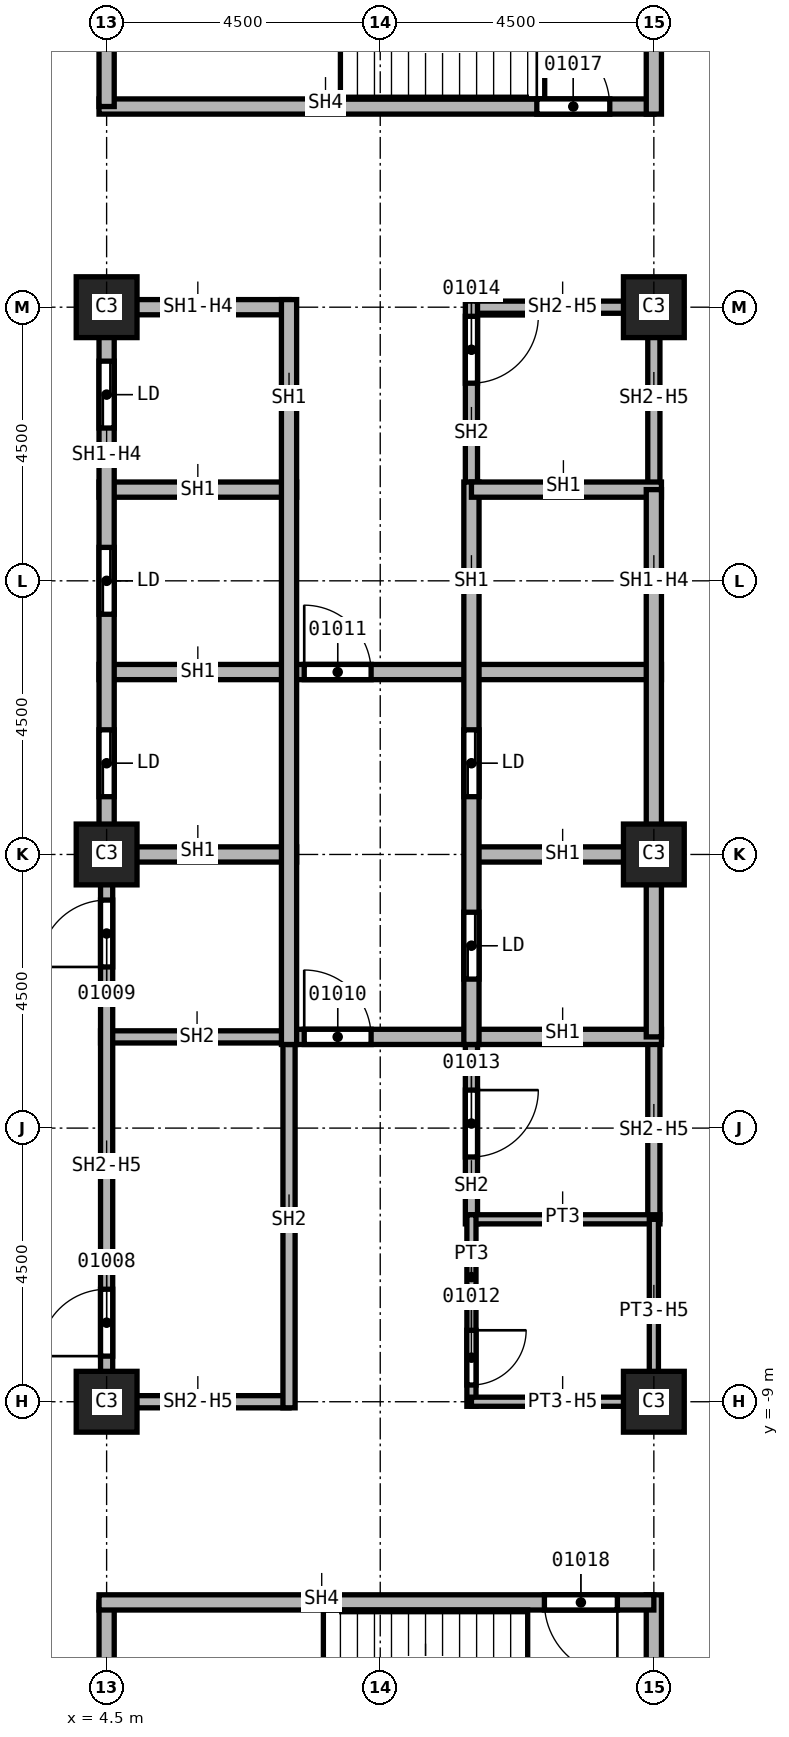
"""IFC4 building model, lengths in metres.
Left out: names, types, materials, properties, quantities, classifications, styles, units other than length and angle.
Written with IfcOpenShell. Run it as: python <this file> out.ifc"""

import sys

from ifc_helpers import new_model, si_unit, direction, frame, frame_2d, origin, origin_2d, place, context, subcontext, project, spatial, rectangle, extrude, element, fill, save


model = new_model("IFC4")
c1 = context("Model", 3, precision=1e-05, world=origin(), true_north=direction((0.0, 1.0)))
c2 = subcontext(c1, "Body", "Model", "MODEL_VIEW")
j1 = project(units=[si_unit("LENGTHUNIT", "METRE"), si_unit("PLANEANGLEUNIT", "RADIAN")], contexts=[c1])
p1 = place(None, origin())
s1 = spatial("IfcSite", under=j1, at=p1, CompositionType="ELEMENT")
p2 = place(p1, origin())
s2 = spatial("IfcBuilding", under=s1, at=p2, CompositionType="ELEMENT")
p3 = place(p2, frame((0.0, 0.0, 68.0)))
s3 = spatial("IfcBuildingStorey", under=s2, at=p3, CompositionType="ELEMENT", Elevation=68.0)
for number, where, z_axis, x_axis in (
    (1, (4.5, 0.0, 0.0), (0.0, 0.0, 1.0), (1.0, 0.0, 0.0)),
    (2, (4.5, 9.0, 0.0), (0.0, 0.0, 1.0), (1.0, 0.0, 0.0)),
    (3, (4.5, -9.0, 0.0), (0.0, 0.0, 1.0), (1.0, 0.0, 0.0)),
    (4, (13.5, 0.0, 0.0), (0.0, 0.0, 1.0), (1.0, 0.0, 0.0)),
    (5, (13.5, 9.0, 0.0), (0.0, 0.0, 1.0), (1.0, 0.0, 0.0)),
    (6, (13.5, -9.0, 0.0), (0.0, 0.0, 1.0), (1.0, 0.0, 0.0)),
):
    element("IfcColumn", number, at=place(p3, frame(where, z_axis=z_axis, x_axis=x_axis)), inside=s3, PredefinedType="COLUMN", context=c2, shape_type="SweptSolid", body=[
        extrude(rectangle(XDim=1.0, YDim=1.0, at=origin_2d()), origin(), (0.0, 0.0, 1.0), 3.7),
    ])
p4 = place(p3, frame((4.4, -3.0, 0.0), z_axis=(0.0, 0.0, 1.0), x_axis=(1.0, 0.0, 0.0)))
e7 = element("IfcWall", 7, at=p4, inside=s3, PredefinedType="SOLIDWALL", context=c2, shape_type="SweptSolid", body=[
    extrude(rectangle(XDim=3.225, YDim=0.2, at=frame_2d((1.613, 0.0))), origin(), (0.0, 0.0, 1.0), 3.7),
])
p5 = place(p3, frame((4.5, -9.1, 0.0), z_axis=(0.0, 0.0, 1.0), x_axis=(0.0, 1.0, 0.0)))
e8 = element("IfcWall", 8, at=p5, inside=s3, PredefinedType="SOLIDWALL", context=c2, shape_type="SweptSolid", body=[
    extrude(rectangle(XDim=9.1, YDim=0.2, at=frame_2d((4.55, 0.0))), origin(), (0.0, 0.0, 1.0), 2.938),
])
p6 = place(p5, frame((0.85, 0.0, 0.0)))
e9 = element("IfcOpeningElement", 9, at=p6, cuts=e8, PredefinedType="OPENING", context=c2, shape_type="SweptSolid", body=[
    extrude(rectangle(XDim=1.1, YDim=2.1, at=frame_2d((0.55, 1.05))), frame((0.0, 0.1, 0.0), z_axis=(0.0, -1.0, 0.0), x_axis=(1.0, 0.0, 0.0)), (0.0, 0.0, 1.0), 0.2),
])
p7 = place(p5, frame((7.25, 0.0, 0.0)))
e10 = element("IfcOpeningElement", 10, at=p7, cuts=e8, PredefinedType="OPENING", context=c2, shape_type="SweptSolid", body=[
    extrude(rectangle(XDim=1.1, YDim=2.1, at=frame_2d((0.55, 1.05))), frame((0.0, 0.1, 0.0), z_axis=(0.0, -1.0, 0.0), x_axis=(1.0, 0.0, 0.0)), (0.0, 0.0, 1.0), 0.2),
])
p8 = place(p3, frame((7.5, -9.0, 0.0), z_axis=(0.0, 0.0, 1.0), x_axis=(-1.0, 0.0, 0.0)))
e11 = element("IfcWall", 11, at=p8, inside=s3, PredefinedType="SOLIDWALL", context=c2, shape_type="SweptSolid", body=[
    extrude(rectangle(XDim=3.0, YDim=0.2, at=frame_2d((1.5, 0.0))), origin(), (0.0, 0.0, 1.0), 2.938),
])
p9 = place(p3, frame((7.5, -2.875, 0.0), z_axis=(0.0, 0.0, 1.0), x_axis=(0.0, -1.0, 0.0)))
e12 = element("IfcWall", 12, at=p9, inside=s3, PredefinedType="SOLIDWALL", context=c2, shape_type="SweptSolid", body=[
    extrude(rectangle(XDim=6.225, YDim=0.2, at=frame_2d((3.113, 0.0))), origin(), (0.0, 0.0, 1.0), 3.7),
])
p10 = place(p3, frame((10.5, -2.875, 0.0), z_axis=(0.0, 0.0, 1.0), x_axis=(0.0, -1.0, 0.0)))
e13 = element("IfcWall", 13, at=p10, inside=s3, PredefinedType="SOLIDWALL", context=c2, shape_type="SweptSolid", body=[
    extrude(rectangle(XDim=3.2, YDim=0.2, at=frame_2d((1.6, 0.0))), origin(), (0.0, 0.0, 1.0), 3.7),
])
p11 = place(p10, frame((1.0, 0.0, 0.0)))
e14 = element("IfcOpeningElement", 14, at=p11, cuts=e13, PredefinedType="OPENING", context=c2, shape_type="SweptSolid", body=[
    extrude(rectangle(XDim=1.1, YDim=2.1, at=frame_2d((0.55, 1.05))), frame((0.0, 0.1, 0.0), z_axis=(0.0, -1.0, 0.0), x_axis=(1.0, 0.0, 0.0)), (0.0, 0.0, 1.0), 0.2),
])
p12 = place(p3, frame((10.5, 9.0, 0.0), z_axis=(0.0, 0.0, 1.0), x_axis=(1.0, 0.0, 0.0)))
e15 = element("IfcWall", 15, at=p12, inside=s3, PredefinedType="SOLIDWALL", context=c2, shape_type="SweptSolid", body=[
    extrude(rectangle(XDim=3.0, YDim=0.2, at=frame_2d((1.5, 0.0))), origin(), (0.0, 0.0, 1.0), 2.938),
])
p13 = place(p3, frame((10.5, 9.1, 0.0), z_axis=(0.0, 0.0, 1.0), x_axis=(0.0, -1.0, 0.0)))
e16 = element("IfcWall", 16, at=p13, inside=s3, PredefinedType="SOLIDWALL", context=c2, shape_type="SweptSolid", body=[
    extrude(rectangle(XDim=3.225, YDim=0.2, at=frame_2d((1.613, 0.0))), origin(), (0.0, 0.0, 1.0), 3.7),
])
p14 = place(p13, frame((0.25, 0.0, 0.0)))
e17 = element("IfcOpeningElement", 17, at=p14, cuts=e16, PredefinedType="OPENING", context=c2, shape_type="SweptSolid", body=[
    extrude(rectangle(XDim=1.1, YDim=2.1, at=frame_2d((0.55, 1.05))), frame((0.0, 0.1, 0.0), z_axis=(0.0, -1.0, 0.0), x_axis=(1.0, 0.0, 0.0)), (0.0, 0.0, 1.0), 0.2),
])
p15 = place(p3, frame((13.5, -3.0, 0.0), z_axis=(0.0, 0.0, 1.0), x_axis=(0.0, -1.0, 0.0)))
e18 = element("IfcWall", 18, at=p15, inside=s3, PredefinedType="SOLIDWALL", context=c2, shape_type="SweptSolid", body=[
    extrude(rectangle(XDim=3.0, YDim=0.2, at=frame_2d((1.5, 0.0))), origin(), (0.0, 0.0, 1.0), 2.938),
])
p16 = place(p3, frame((13.5, 9.1, 0.0), z_axis=(0.0, 0.0, 1.0), x_axis=(0.0, -1.0, 0.0)))
e19 = element("IfcWall", 19, at=p16, inside=s3, PredefinedType="SOLIDWALL", context=c2, shape_type="SweptSolid", body=[
    extrude(rectangle(XDim=3.1, YDim=0.2, at=frame_2d((1.55, 0.0))), origin(), (0.0, 0.0, 1.0), 2.938),
])
p17 = place(p3, frame((4.375, 0.0, 0.0), z_axis=(0.0, 0.0, 1.0), x_axis=(1.0, 0.0, 0.0)))
e20 = element("IfcWall", 20, at=p17, inside=s3, PredefinedType="SOLIDWALL", context=c2, shape_type="SweptSolid", body=[
    extrude(rectangle(XDim=3.25, YDim=0.25, at=frame_2d((1.625, 0.0))), origin(), (0.0, 0.0, 1.0), 3.7),
])
p18 = place(p3, frame((4.375, 3.0, 0.0), z_axis=(0.0, 0.0, 1.0), x_axis=(1.0, 0.0, 0.0)))
e21 = element("IfcWall", 21, at=p18, inside=s3, PredefinedType="SOLIDWALL", context=c2, shape_type="SweptSolid", body=[
    extrude(rectangle(XDim=9.25, YDim=0.25, at=frame_2d((4.625, 0.0))), origin(), (0.0, 0.0, 1.0), 3.7),
])
p19 = place(p18, frame((3.375, 0.0, 0.0)))
e22 = element("IfcOpeningElement", 22, at=p19, cuts=e21, PredefinedType="OPENING", context=c2, shape_type="SweptSolid", body=[
    extrude(rectangle(XDim=1.1, YDim=2.1, at=frame_2d((0.55, 1.05))), frame((0.0, 0.125, 0.0), z_axis=(0.0, -1.0, 0.0), x_axis=(1.0, 0.0, 0.0)), (0.0, 0.0, 1.0), 0.25),
])
p20 = place(p3, frame((4.375, 6.0, 0.0), z_axis=(0.0, 0.0, 1.0), x_axis=(1.0, 0.0, 0.0)))
e23 = element("IfcWall", 23, at=p20, inside=s3, PredefinedType="SOLIDWALL", context=c2, shape_type="SweptSolid", body=[
    extrude(rectangle(XDim=3.25, YDim=0.25, at=frame_2d((1.625, 0.0))), origin(), (0.0, 0.0, 1.0), 3.7),
])
p21 = place(p3, frame((4.5, 0.0, 0.0), z_axis=(0.0, 0.0, 1.0), x_axis=(0.0, 1.0, 0.0)))
e24 = element("IfcWall", 24, at=p21, inside=s3, PredefinedType="SOLIDWALL", context=c2, shape_type="SweptSolid", body=[
    extrude(rectangle(XDim=9.125, YDim=0.25, at=frame_2d((4.562, 0.0))), origin(), (0.0, 0.0, 1.0), 2.938),
])
p22 = place(p21, frame((0.95, 0.0, 0.0)))
e25 = element("IfcOpeningElement", 25, at=p22, cuts=e24, PredefinedType="OPENING", context=c2, shape_type="SweptSolid", body=[
    extrude(rectangle(XDim=1.1, YDim=2.1, at=frame_2d((0.55, 1.05))), frame((0.0, 0.125, 0.0), z_axis=(0.0, -1.0, 0.0), x_axis=(1.0, 0.0, 0.0)), (0.0, 0.0, 1.0), 0.25),
])
p23 = place(p21, frame((3.95, 0.0, 0.0)))
e26 = element("IfcOpeningElement", 26, at=p23, cuts=e24, PredefinedType="OPENING", context=c2, shape_type="SweptSolid", body=[
    extrude(rectangle(XDim=1.1, YDim=2.1, at=frame_2d((0.55, 1.05))), frame((0.0, 0.125, 0.0), z_axis=(0.0, -1.0, 0.0), x_axis=(1.0, 0.0, 0.0)), (0.0, 0.0, 1.0), 0.25),
])
p24 = place(p21, frame((7.012, 0.0, 0.0)))
e27 = element("IfcOpeningElement", 27, at=p24, cuts=e24, PredefinedType="OPENING", context=c2, shape_type="SweptSolid", body=[
    extrude(rectangle(XDim=1.1, YDim=2.1, at=frame_2d((0.55, 1.05))), frame((0.0, 0.125, 0.0), z_axis=(0.0, -1.0, 0.0), x_axis=(1.0, 0.0, 0.0)), (0.0, 0.0, 1.0), 0.25),
])
p25 = place(p3, frame((4.5, 9.0, 0.0), z_axis=(0.0, 0.0, 1.0), x_axis=(1.0, 0.0, 0.0)))
e28 = element("IfcWall", 28, at=p25, inside=s3, PredefinedType="SOLIDWALL", context=c2, shape_type="SweptSolid", body=[
    extrude(rectangle(XDim=3.0, YDim=0.25, at=frame_2d((1.5, 0.0))), origin(), (0.0, 0.0, 1.0), 2.938),
])
p26 = place(p3, frame((7.5, -3.0, 0.0), z_axis=(0.0, 0.0, 1.0), x_axis=(1.0, 0.0, 0.0)))
e29 = element("IfcWall", 29, at=p26, inside=s3, PredefinedType="SOLIDWALL", context=c2, shape_type="SweptSolid", body=[
    extrude(rectangle(XDim=6.125, YDim=0.25, at=frame_2d((3.062, 0.0))), origin(), (0.0, 0.0, 1.0), 3.7),
])
p27 = place(p26, frame((0.25, 0.0, 0.0)))
e30 = element("IfcOpeningElement", 30, at=p27, cuts=e29, PredefinedType="OPENING", context=c2, shape_type="SweptSolid", body=[
    extrude(rectangle(XDim=1.1, YDim=2.1, at=frame_2d((0.55, 1.05))), frame((0.0, 0.125, 0.0), z_axis=(0.0, -1.0, 0.0), x_axis=(1.0, 0.0, 0.0)), (0.0, 0.0, 1.0), 0.25),
])
p28 = place(p3, frame((7.5, 9.125, 0.0), z_axis=(0.0, 0.0, 1.0), x_axis=(0.0, -1.0, 0.0)))
e31 = element("IfcWall", 31, at=p28, inside=s3, PredefinedType="SOLIDWALL", context=c2, shape_type="SweptSolid", body=[
    extrude(rectangle(XDim=12.25, YDim=0.25, at=frame_2d((6.125, 0.0))), origin(), (0.0, 0.0, 1.0), 3.7),
])
p29 = place(p3, frame((10.5, 0.0, 0.0), z_axis=(0.0, 0.0, 1.0), x_axis=(1.0, 0.0, 0.0)))
e32 = element("IfcWall", 32, at=p29, inside=s3, PredefinedType="SOLIDWALL", context=c2, shape_type="SweptSolid", body=[
    extrude(rectangle(XDim=3.125, YDim=0.25, at=frame_2d((1.562, 0.0))), origin(), (0.0, 0.0, 1.0), 3.7),
])
p30 = place(p3, frame((10.5, 6.125, 0.0), z_axis=(0.0, 0.0, 1.0), x_axis=(0.0, -1.0, 0.0)))
e33 = element("IfcWall", 33, at=p30, inside=s3, PredefinedType="SOLIDWALL", context=c2, shape_type="SweptSolid", body=[
    extrude(rectangle(XDim=9.25, YDim=0.25, at=frame_2d((4.625, 0.0))), origin(), (0.0, 0.0, 1.0), 3.7),
])
p31 = place(p30, frame((7.075, 0.0, 0.0)))
e34 = element("IfcOpeningElement", 34, at=p31, cuts=e33, PredefinedType="OPENING", context=c2, shape_type="SweptSolid", body=[
    extrude(rectangle(XDim=1.1, YDim=2.1, at=frame_2d((0.55, 1.05))), frame((0.0, 0.125, 0.0), z_axis=(0.0, -1.0, 0.0), x_axis=(1.0, 0.0, 0.0)), (0.0, 0.0, 1.0), 0.25),
])
p32 = place(p30, frame((4.075, 0.0, 0.0)))
e35 = element("IfcOpeningElement", 35, at=p32, cuts=e33, PredefinedType="OPENING", context=c2, shape_type="SweptSolid", body=[
    extrude(rectangle(XDim=1.1, YDim=2.1, at=frame_2d((0.55, 1.05))), frame((0.0, 0.125, 0.0), z_axis=(0.0, -1.0, 0.0), x_axis=(1.0, 0.0, 0.0)), (0.0, 0.0, 1.0), 0.25),
])
p33 = place(p3, frame((10.5, 6.0, 0.0), z_axis=(0.0, 0.0, 1.0), x_axis=(1.0, 0.0, 0.0)))
e36 = element("IfcWall", 36, at=p33, inside=s3, PredefinedType="SOLIDWALL", context=c2, shape_type="SweptSolid", body=[
    extrude(rectangle(XDim=3.125, YDim=0.25, at=frame_2d((1.562, 0.0))), origin(), (0.0, 0.0, 1.0), 3.7),
])
p34 = place(p3, frame((13.5, 6.0, 0.0), z_axis=(0.0, 0.0, 1.0), x_axis=(0.0, -1.0, 0.0)))
e37 = element("IfcWall", 37, at=p34, inside=s3, PredefinedType="SOLIDWALL", context=c2, shape_type="SweptSolid", body=[
    extrude(rectangle(XDim=9.0, YDim=0.25, at=frame_2d((4.5, 0.0))), origin(), (0.0, 0.0, 1.0), 2.938),
])
p35 = place(p3, frame((4.375, 12.3, 0.0), z_axis=(0.0, 0.0, 1.0), x_axis=(1.0, 0.0, 0.0)))
e38 = element("IfcWall", 38, at=p35, inside=s3, PredefinedType="SOLIDWALL", context=c2, shape_type="SweptSolid", body=[
    extrude(rectangle(XDim=9.125, YDim=0.25, at=frame_2d((4.562, 0.0))), origin(), (0.0, 0.0, 1.0), 3.7),
])
p36 = place(p35, frame((7.2, 0.0, 0.0)))
e39 = element("IfcOpeningElement", 39, at=p36, cuts=e38, PredefinedType="OPENING", context=c2, shape_type="SweptSolid", body=[
    extrude(rectangle(XDim=1.2, YDim=2.1, at=frame_2d((0.6, 1.05))), frame((0.0, 0.125, 0.0), z_axis=(0.0, -1.0, 0.0), x_axis=(1.0, 0.0, 0.0)), (0.0, 0.0, 1.0), 0.25),
])
for number, where, z_axis, x_axis in (
    (40, (4.5, -16.8, 0.0), (0.0, 0.0, 1.0), (0.0, 1.0, 0.0)),
    (41, (4.5, 12.3, 0.0), (0.0, 0.0, 1.0), (0.0, 1.0, 0.0)),
):
    element("IfcWall", number, at=place(p3, frame(where, z_axis=z_axis, x_axis=x_axis)), inside=s3, PredefinedType="SOLIDWALL", context=c2, shape_type="SweptSolid", body=[
        extrude(rectangle(XDim=4.5, YDim=0.25, at=frame_2d((2.25, 0.0))), origin(), (0.0, 0.0, 1.0), 3.7),
    ])
p37 = place(p3, frame((13.5, -16.925, 0.0), z_axis=(0.0, 0.0, 1.0), x_axis=(0.0, 1.0, 0.0)))
e42 = element("IfcWall", 42, at=p37, inside=s3, PredefinedType="SOLIDWALL", context=c2, shape_type="SweptSolid", body=[
    extrude(rectangle(XDim=4.75, YDim=0.25, at=frame_2d((2.375, 0.0))), origin(), (0.0, 0.0, 1.0), 3.7),
])
p38 = place(p3, frame((13.5, -12.3, 0.0), z_axis=(0.0, 0.0, 1.0), x_axis=(-1.0, 0.0, 0.0)))
e43 = element("IfcWall", 43, at=p38, inside=s3, PredefinedType="SOLIDWALL", context=c2, shape_type="SweptSolid", body=[
    extrude(rectangle(XDim=9.125, YDim=0.25, at=frame_2d((4.562, 0.0))), origin(), (0.0, 0.0, 1.0), 3.7),
])
p39 = place(p38, frame((0.6, 0.0, 0.0)))
e44 = element("IfcOpeningElement", 44, at=p39, cuts=e43, PredefinedType="OPENING", context=c2, shape_type="SweptSolid", body=[
    extrude(rectangle(XDim=1.2, YDim=2.1, at=frame_2d((0.6, 1.05))), frame((0.0, 0.125, 0.0), z_axis=(0.0, -1.0, 0.0), x_axis=(1.0, 0.0, 0.0)), (0.0, 0.0, 1.0), 0.25),
])
p40 = place(p3, frame((13.5, 12.175, 0.0), z_axis=(0.0, 0.0, 1.0), x_axis=(0.0, 1.0, 0.0)))
e45 = element("IfcWall", 45, at=p40, inside=s3, PredefinedType="SOLIDWALL", context=c2, shape_type="SweptSolid", body=[
    extrude(rectangle(XDim=4.75, YDim=0.25, at=frame_2d((2.375, 0.0))), origin(), (0.0, 0.0, 1.0), 3.7),
])
p41 = place(p3, frame((10.5, -6.0, 0.0), z_axis=(0.0, 0.0, 1.0), x_axis=(1.0, 0.0, 0.0)))
e46 = element("IfcWall", 46, at=p41, inside=s3, PredefinedType="PARTITIONING", context=c2, shape_type="SweptSolid", body=[
    extrude(rectangle(XDim=3.1, YDim=0.15, at=frame_2d((1.55, 0.0))), origin(), (0.0, 0.0, 1.0), 3.7),
])
p42 = place(p3, frame((10.5, -5.925, 0.0), z_axis=(0.0, 0.0, 1.0), x_axis=(0.0, -1.0, 0.0)))
e47 = element("IfcWall", 47, at=p42, inside=s3, PredefinedType="PARTITIONING", context=c2, shape_type="SweptSolid", body=[
    extrude(rectangle(XDim=3.15, YDim=0.15, at=frame_2d((1.575, 0.0))), origin(), (0.0, 0.0, 1.0), 3.7),
])
p43 = place(p42, frame((1.9, 0.0, 0.0)))
e48 = element("IfcOpeningElement", 48, at=p43, cuts=e47, PredefinedType="OPENING", context=c2, shape_type="SweptSolid", body=[
    extrude(rectangle(XDim=0.9, YDim=2.1, at=frame_2d((0.45, 1.05))), frame((0.0, 0.075, 0.0), z_axis=(0.0, -1.0, 0.0), x_axis=(1.0, 0.0, 0.0)), (0.0, 0.0, 1.0), 0.15),
])
p44 = place(p3, frame((13.5, -9.0, 0.0), z_axis=(0.0, 0.0, 1.0), x_axis=(-1.0, 0.0, 0.0)))
e49 = element("IfcWall", 49, at=p44, inside=s3, PredefinedType="PARTITIONING", context=c2, shape_type="SweptSolid", body=[
    extrude(rectangle(XDim=3.0, YDim=0.15, at=frame_2d((1.5, 0.0))), origin(), (0.0, 0.0, 1.0), 2.938),
])
p45 = place(p3, frame((13.5, -6.0, 0.0), z_axis=(0.0, 0.0, 1.0), x_axis=(0.0, -1.0, 0.0)))
e50 = element("IfcWall", 50, at=p45, inside=s3, PredefinedType="PARTITIONING", context=c2, shape_type="SweptSolid", body=[
    extrude(rectangle(XDim=3.075, YDim=0.15, at=frame_2d((1.538, 0.0))), origin(), (0.0, 0.0, 1.0), 2.938),
])
p46 = place(p6, origin())
e51 = element("IfcDoor", 51, at=p46, inside=s3, OperationType="SINGLE_SWING_LEFT", PredefinedType="DOOR", context=c2, shape_type="SweptSolid", body=[
    extrude(rectangle(XDim=1.1, YDim=2.1, at=frame_2d((0.55, 1.05))), frame((0.0, 0.025, 0.0), z_axis=(0.0, -1.0, 0.0), x_axis=(1.0, 0.0, 0.0)), (0.0, 0.0, 1.0), 0.05),
])
fill(e9, e51)
p47 = place(p7, origin())
e52 = element("IfcDoor", 52, at=p47, inside=s3, OperationType="SINGLE_SWING_RIGHT", PredefinedType="DOOR", context=c2, shape_type="SweptSolid", body=[
    extrude(rectangle(XDim=1.1, YDim=2.1, at=frame_2d((0.55, 1.05))), frame((0.0, 0.025, 0.0), z_axis=(0.0, -1.0, 0.0), x_axis=(1.0, 0.0, 0.0)), (0.0, 0.0, 1.0), 0.05),
])
fill(e10, e52)
p48 = place(p27, origin())
e53 = element("IfcDoor", 53, at=p48, inside=s3, OperationType="SINGLE_SWING_LEFT", PredefinedType="DOOR", context=c2, shape_type="SweptSolid", body=[
    extrude(rectangle(XDim=1.1, YDim=2.1, at=frame_2d((0.55, 1.05))), frame((0.0, 0.025, 0.0), z_axis=(0.0, -1.0, 0.0), x_axis=(1.0, 0.0, 0.0)), (0.0, 0.0, 1.0), 0.05),
])
fill(e30, e53)
p49 = place(p19, origin())
e54 = element("IfcDoor", 54, at=p49, inside=s3, OperationType="SINGLE_SWING_RIGHT", PredefinedType="DOOR", context=c2, shape_type="SweptSolid", body=[
    extrude(rectangle(XDim=1.1, YDim=2.1, at=frame_2d((0.55, 1.05))), frame((0.0, 0.025, 0.0), z_axis=(0.0, -1.0, 0.0), x_axis=(1.0, 0.0, 0.0)), (0.0, 0.0, 1.0), 0.05),
])
fill(e22, e54)
p50 = place(p43, origin())
e55 = element("IfcDoor", 55, at=p50, inside=s3, OperationType="SINGLE_SWING_LEFT", PredefinedType="DOOR", context=c2, shape_type="SweptSolid", body=[
    extrude(rectangle(XDim=0.9, YDim=2.1, at=frame_2d((0.45, 1.05))), frame((0.0, 0.025, 0.0), z_axis=(0.0, -1.0, 0.0), x_axis=(1.0, 0.0, 0.0)), (0.0, 0.0, 1.0), 0.05),
])
fill(e48, e55)
p51 = place(p11, origin())
e56 = element("IfcDoor", 56, at=p51, inside=s3, OperationType="SINGLE_SWING_RIGHT", PredefinedType="DOOR", context=c2, shape_type="SweptSolid", body=[
    extrude(rectangle(XDim=1.1, YDim=2.1, at=frame_2d((0.55, 1.05))), frame((0.0, 0.025, 0.0), z_axis=(0.0, -1.0, 0.0), x_axis=(1.0, 0.0, 0.0)), (0.0, 0.0, 1.0), 0.05),
])
fill(e14, e56)
p52 = place(p14, origin())
e57 = element("IfcDoor", 57, at=p52, inside=s3, OperationType="SINGLE_SWING_LEFT", PredefinedType="DOOR", context=c2, shape_type="SweptSolid", body=[
    extrude(rectangle(XDim=1.1, YDim=2.1, at=frame_2d((0.55, 1.05))), frame((0.0, 0.025, 0.0), z_axis=(0.0, -1.0, 0.0), x_axis=(1.0, 0.0, 0.0)), (0.0, 0.0, 1.0), 0.05),
])
fill(e17, e57)
p53 = place(p36, origin())
e58 = element("IfcDoor", 58, at=p53, inside=s3, OperationType="SINGLE_SWING_RIGHT", PredefinedType="DOOR", context=c2, shape_type="SweptSolid", body=[
    extrude(rectangle(XDim=1.2, YDim=2.1, at=frame_2d((0.6, 1.05))), frame((0.0, 0.025, 0.0), z_axis=(0.0, -1.0, 0.0), x_axis=(1.0, 0.0, 0.0)), (0.0, 0.0, 1.0), 0.05),
])
fill(e39, e58)
p54 = place(p39, origin())
e59 = element("IfcDoor", 59, at=p54, inside=s3, OperationType="SINGLE_SWING_LEFT", PredefinedType="DOOR", context=c2, shape_type="SweptSolid", body=[
    extrude(rectangle(XDim=1.2, YDim=2.1, at=frame_2d((0.6, 1.05))), frame((0.0, 0.025, 0.0), z_axis=(0.0, -1.0, 0.0), x_axis=(1.0, 0.0, 0.0)), (0.0, 0.0, 1.0), 0.05),
])
fill(e44, e59)
p55 = place(p22, origin())
e60 = element("IfcDoor", 60, at=p55, inside=s3, OperationType="SLIDING_TO_LEFT", PredefinedType="DOOR", context=c2, shape_type="SweptSolid", body=[
    extrude(rectangle(XDim=1.1, YDim=2.1, at=frame_2d((0.55, 1.05))), frame((0.0, 0.025, 0.0), z_axis=(0.0, -1.0, 0.0), x_axis=(1.0, 0.0, 0.0)), (0.0, 0.0, 1.0), 0.05),
])
fill(e25, e60)
p56 = place(p23, origin())
e61 = element("IfcDoor", 61, at=p56, inside=s3, OperationType="SLIDING_TO_LEFT", PredefinedType="DOOR", context=c2, shape_type="SweptSolid", body=[
    extrude(rectangle(XDim=1.1, YDim=2.1, at=frame_2d((0.55, 1.05))), frame((0.0, 0.025, 0.0), z_axis=(0.0, -1.0, 0.0), x_axis=(1.0, 0.0, 0.0)), (0.0, 0.0, 1.0), 0.05),
])
fill(e26, e61)
p57 = place(p24, origin())
e62 = element("IfcDoor", 62, at=p57, inside=s3, OperationType="SLIDING_TO_LEFT", PredefinedType="DOOR", context=c2, shape_type="SweptSolid", body=[
    extrude(rectangle(XDim=1.1, YDim=2.1, at=frame_2d((0.55, 1.05))), frame((0.0, 0.025, 0.0), z_axis=(0.0, -1.0, 0.0), x_axis=(1.0, 0.0, 0.0)), (0.0, 0.0, 1.0), 0.05),
])
fill(e27, e62)
p58 = place(p31, origin())
e63 = element("IfcDoor", 63, at=p58, inside=s3, OperationType="SLIDING_TO_LEFT", PredefinedType="DOOR", context=c2, shape_type="SweptSolid", body=[
    extrude(rectangle(XDim=1.1, YDim=2.1, at=frame_2d((0.55, 1.05))), frame((0.0, 0.025, 0.0), z_axis=(0.0, -1.0, 0.0), x_axis=(1.0, 0.0, 0.0)), (0.0, 0.0, 1.0), 0.05),
])
fill(e34, e63)
p59 = place(p32, origin())
e64 = element("IfcDoor", 64, at=p59, inside=s3, OperationType="SLIDING_TO_LEFT", PredefinedType="DOOR", context=c2, shape_type="SweptSolid", body=[
    extrude(rectangle(XDim=1.1, YDim=2.1, at=frame_2d((0.55, 1.05))), frame((0.0, 0.025, 0.0), z_axis=(0.0, -1.0, 0.0), x_axis=(1.0, 0.0, 0.0)), (0.0, 0.0, 1.0), 0.05),
])
fill(e35, e64)
save(model, sys.argv[1])
